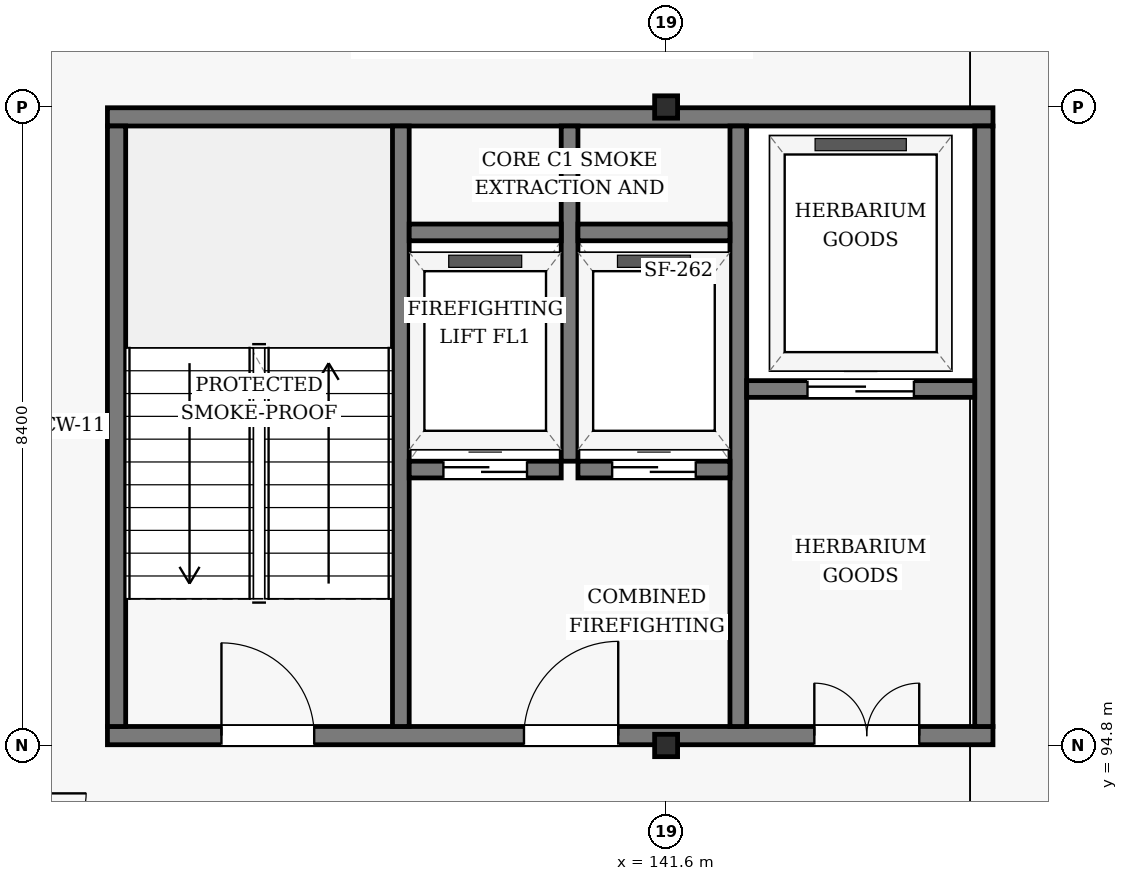
"""IFC4 building model, lengths in metres.
Left out: names, types, materials, properties, quantities, classifications, styles, units other than length and angle.
Written with IfcOpenShell. Run it as: python <this file> out.ifc"""

import sys

from ifc_helpers import new_model, si_unit, direction, frame, frame_2d, origin, origin_2d, place, context, subcontext, project, spatial, rectangle, i_section, extrude, element, fill, save


model = new_model("IFC4")
c1 = context("Model", 3, precision=1e-05, world=origin(), true_north=direction((0.0, 1.0)))
c2 = subcontext(c1, "Body", "Model", "MODEL_VIEW")
j1 = project(units=[si_unit("LENGTHUNIT", "METRE"), si_unit("PLANEANGLEUNIT", "RADIAN")], contexts=[c1])
p1 = place(None, origin())
s1 = spatial("IfcSite", under=j1, at=p1, CompositionType="ELEMENT")
p2 = place(p1, origin())
s2 = spatial("IfcBuilding", under=s1, at=p2, CompositionType="ELEMENT")
p3 = place(p2, frame((0.0, 0.0, 50.4)))
s3 = spatial("IfcBuildingStorey", under=s2, at=p3, CompositionType="ELEMENT", Elevation=50.4)
for number, where, z_axis, x_axis in (
    (1, (141.6, 94.8, 0.0), (0.0, 0.0, 1.0), (1.0, 0.0, 0.0)),
    (2, (141.6, 103.2, 0.0), (0.0, 0.0, 1.0), (1.0, 0.0, 0.0)),
):
    element("IfcColumn", number, at=place(p3, frame(where, z_axis=z_axis, x_axis=x_axis)), inside=s3, PredefinedType="COLUMN", context=c2, shape_type="SweptSolid", body=[
        extrude(i_section(OverallWidth=0.302, OverallDepth=0.294, WebThickness=0.012, FlangeThickness=0.012, FilletRadius=0.018, at=origin_2d()), origin(), (0.0, 0.0, 1.0), 3.6),
    ])
p4 = place(p3, frame((134.25, 94.93, 0.0), z_axis=(0.0, 0.0, 1.0), x_axis=(1.0, 0.0, 0.0)))
e3 = element("IfcWall", 3, at=p4, inside=s3, PredefinedType="SHEAR", context=c2, shape_type="SweptSolid", body=[
    extrude(rectangle(XDim=11.65, YDim=0.24, at=frame_2d((5.825, 0.0))), origin(), (0.0, 0.0, 1.0), 3.346),
])
p5 = place(p4, frame((1.5, 0.0, 0.0)))
e4 = element("IfcOpeningElement", 4, at=p5, cuts=e3, PredefinedType="OPENING", context=c2, shape_type="SweptSolid", body=[
    extrude(rectangle(XDim=1.22, YDim=2.18, at=frame_2d((0.61, 1.09))), frame((0.0, 0.13, 0.0), z_axis=(0.0, -1.0, 0.0), x_axis=(1.0, 0.0, 0.0)), (0.0, 0.0, 1.0), 0.26),
])
p6 = place(p4, frame((5.48, 0.0, 0.0)))
e5 = element("IfcOpeningElement", 5, at=p6, cuts=e3, PredefinedType="OPENING", context=c2, shape_type="SweptSolid", body=[
    extrude(rectangle(XDim=1.24, YDim=2.15, at=frame_2d((0.62, 1.075))), frame((0.0, 0.13, 0.0), z_axis=(0.0, -1.0, 0.0), x_axis=(1.0, 0.0, 0.0)), (0.0, 0.0, 1.0), 0.26),
])
p7 = place(p4, frame((9.3, 0.0, 0.0)))
e6 = element("IfcOpeningElement", 6, at=p7, cuts=e3, PredefinedType="OPENING", context=c2, shape_type="SweptSolid", body=[
    extrude(rectangle(XDim=1.38, YDim=2.15, at=frame_2d((0.69, 1.075))), frame((0.0, 0.13, 0.0), z_axis=(0.0, -1.0, 0.0), x_axis=(1.0, 0.0, 0.0)), (0.0, 0.0, 1.0), 0.26),
])
p8 = place(p3, frame((134.25, 103.07, 0.0), z_axis=(0.0, 0.0, 1.0), x_axis=(1.0, 0.0, 0.0)))
e7 = element("IfcWall", 7, at=p8, inside=s3, PredefinedType="SHEAR", context=c2, shape_type="SweptSolid", body=[
    extrude(rectangle(XDim=11.65, YDim=0.24, at=frame_2d((5.825, 0.0))), origin(), (0.0, 0.0, 1.0), 3.346),
])
p9 = place(p3, frame((134.37, 95.05, 0.0), z_axis=(0.0, 0.0, 1.0), x_axis=(0.0, 1.0, 0.0)))
e8 = element("IfcWall", 8, at=p9, inside=s3, PredefinedType="SHEAR", context=c2, shape_type="SweptSolid", body=[
    extrude(rectangle(XDim=7.9, YDim=0.24, at=frame_2d((3.95, 0.0))), origin(), (0.0, 0.0, 1.0), 3.346),
])
p10 = place(p3, frame((138.11, 95.05, 0.0), z_axis=(0.0, 0.0, 1.0), x_axis=(0.0, 1.0, 0.0)))
e9 = element("IfcWall", 9, at=p10, inside=s3, PredefinedType="SHEAR", context=c2, shape_type="SweptSolid", body=[
    extrude(rectangle(XDim=7.9, YDim=0.22, at=frame_2d((3.95, 0.0))), origin(), (0.0, 0.0, 1.0), 3.346),
])
p11 = place(p3, frame((140.33, 98.54, 0.0), z_axis=(0.0, 0.0, 1.0), x_axis=(0.0, 1.0, 0.0)))
e10 = element("IfcWall", 10, at=p11, inside=s3, PredefinedType="SHEAR", context=c2, shape_type="SweptSolid", body=[
    extrude(rectangle(XDim=4.41, YDim=0.22, at=frame_2d((2.205, 0.0))), origin(), (0.0, 0.0, 1.0), 3.346),
])
p12 = place(p3, frame((142.55, 95.05, 0.0), z_axis=(0.0, 0.0, 1.0), x_axis=(0.0, 1.0, 0.0)))
e11 = element("IfcWall", 11, at=p12, inside=s3, PredefinedType="SHEAR", context=c2, shape_type="SweptSolid", body=[
    extrude(rectangle(XDim=7.9, YDim=0.22, at=frame_2d((3.95, 0.0))), origin(), (0.0, 0.0, 1.0), 3.346),
])
p13 = place(p3, frame((145.78, 95.05, 0.0), z_axis=(0.0, 0.0, 1.0), x_axis=(0.0, 1.0, 0.0)))
e12 = element("IfcWall", 12, at=p13, inside=s3, PredefinedType="SHEAR", context=c2, shape_type="SweptSolid", body=[
    extrude(rectangle(XDim=7.9, YDim=0.24, at=frame_2d((3.95, 0.0))), origin(), (0.0, 0.0, 1.0), 3.346),
])
p14 = place(p3, frame((138.22, 98.43, 0.0), z_axis=(0.0, 0.0, 1.0), x_axis=(1.0, 0.0, 0.0)))
e13 = element("IfcWall", 13, at=p14, inside=s3, PredefinedType="SHEAR", context=c2, shape_type="SweptSolid", body=[
    extrude(rectangle(XDim=2.0, YDim=0.22, at=frame_2d((1.0, 0.0))), origin(), (0.0, 0.0, 1.0), 3.346),
])
p15 = place(p14, frame((0.45, 0.0, 0.0)))
e14 = element("IfcOpeningElement", 14, at=p15, cuts=e13, PredefinedType="OPENING", context=c2, shape_type="SweptSolid", body=[
    extrude(rectangle(XDim=1.1, YDim=2.15, at=frame_2d((0.55, 1.075))), frame((0.0, 0.12, 0.0), z_axis=(0.0, -1.0, 0.0), x_axis=(1.0, 0.0, 0.0)), (0.0, 0.0, 1.0), 0.24),
])
p16 = place(p3, frame((140.44, 98.43, 0.0), z_axis=(0.0, 0.0, 1.0), x_axis=(1.0, 0.0, 0.0)))
e15 = element("IfcWall", 15, at=p16, inside=s3, PredefinedType="SHEAR", context=c2, shape_type="SweptSolid", body=[
    extrude(rectangle(XDim=2.0, YDim=0.22, at=frame_2d((1.0, 0.0))), origin(), (0.0, 0.0, 1.0), 3.346),
])
p17 = place(p16, frame((0.45, 0.0, 0.0)))
e16 = element("IfcOpeningElement", 16, at=p17, cuts=e15, PredefinedType="OPENING", context=c2, shape_type="SweptSolid", body=[
    extrude(rectangle(XDim=1.1, YDim=2.15, at=frame_2d((0.55, 1.075))), frame((0.0, 0.12, 0.0), z_axis=(0.0, -1.0, 0.0), x_axis=(1.0, 0.0, 0.0)), (0.0, 0.0, 1.0), 0.24),
])
for number, where, z_axis, x_axis in (
    (17, (138.22, 101.55, 0.0), (0.0, 0.0, 1.0), (1.0, 0.0, 0.0)),
    (18, (140.44, 101.55, 0.0), (0.0, 0.0, 1.0), (1.0, 0.0, 0.0)),
):
    element("IfcWall", number, at=place(p3, frame(where, z_axis=z_axis, x_axis=x_axis)), inside=s3, PredefinedType="SHEAR", context=c2, shape_type="SweptSolid", body=[
        extrude(rectangle(XDim=2.0, YDim=0.22, at=frame_2d((1.0, 0.0))), origin(), (0.0, 0.0, 1.0), 3.346),
    ])
p18 = place(p3, frame((142.66, 99.49, 0.0), z_axis=(0.0, 0.0, 1.0), x_axis=(1.0, 0.0, 0.0)))
e19 = element("IfcWall", 19, at=p18, inside=s3, PredefinedType="SHEAR", context=c2, shape_type="SweptSolid", body=[
    extrude(rectangle(XDim=3.0, YDim=0.22, at=frame_2d((1.5, 0.0))), origin(), (0.0, 0.0, 1.0), 3.346),
])
p19 = place(p18, frame((0.8, 0.0, 0.0)))
e20 = element("IfcOpeningElement", 20, at=p19, cuts=e19, PredefinedType="OPENING", context=c2, shape_type="SweptSolid", body=[
    extrude(rectangle(XDim=1.4, YDim=2.2, at=frame_2d((0.7, 1.1))), frame((0.0, 0.12, 0.0), z_axis=(0.0, -1.0, 0.0), x_axis=(1.0, 0.0, 0.0)), (0.0, 0.0, 1.0), 0.24),
])
p20 = place(p5, origin())
e21 = element("IfcDoor", 21, at=p20, inside=s3, OperationType="SINGLE_SWING_LEFT", PredefinedType="DOOR", context=c2, shape_type="SweptSolid", body=[
    extrude(rectangle(XDim=1.22, YDim=2.18, at=frame_2d((0.61, 1.09))), frame((0.0, 0.025, 0.0), z_axis=(0.0, -1.0, 0.0), x_axis=(1.0, 0.0, 0.0)), (0.0, 0.0, 1.0), 0.05),
])
fill(e4, e21)
p21 = place(p6, frame((1.24, 0.0, 0.0), z_axis=(0.0, 0.0, 1.0), x_axis=(-1.0, 0.0, 0.0)))
e22 = element("IfcDoor", 22, at=p21, inside=s3, OperationType="SINGLE_SWING_RIGHT", PredefinedType="DOOR", context=c2, shape_type="SweptSolid", body=[
    extrude(rectangle(XDim=1.24, YDim=2.15, at=frame_2d((0.62, 1.075))), frame((0.0, 0.025, 0.0), z_axis=(0.0, -1.0, 0.0), x_axis=(1.0, 0.0, 0.0)), (0.0, 0.0, 1.0), 0.05),
])
fill(e5, e22)
p22 = place(p7, frame((1.38, 0.0, 0.0), z_axis=(0.0, 0.0, 1.0), x_axis=(-1.0, 0.0, 0.0)))
e23 = element("IfcDoor", 23, at=p22, inside=s3, OperationType="DOUBLE_DOOR_SINGLE_SWING", PredefinedType="DOOR", context=c2, shape_type="SweptSolid", body=[
    extrude(rectangle(XDim=1.38, YDim=2.15, at=frame_2d((0.69, 1.075))), frame((0.0, 0.025, 0.0), z_axis=(0.0, -1.0, 0.0), x_axis=(1.0, 0.0, 0.0)), (0.0, 0.0, 1.0), 0.05),
])
fill(e6, e23)
p23 = place(p15, origin())
e24 = element("IfcDoor", 24, at=p23, inside=s3, OperationType="SLIDING_TO_LEFT", PredefinedType="DOOR", context=c2, shape_type="SweptSolid", body=[
    extrude(rectangle(XDim=1.1, YDim=2.15, at=frame_2d((0.55, 1.075))), frame((0.0, 0.025, 0.0), z_axis=(0.0, -1.0, 0.0), x_axis=(1.0, 0.0, 0.0)), (0.0, 0.0, 1.0), 0.05),
])
fill(e14, e24)
p24 = place(p17, origin())
e25 = element("IfcDoor", 25, at=p24, inside=s3, OperationType="SLIDING_TO_LEFT", PredefinedType="DOOR", context=c2, shape_type="SweptSolid", body=[
    extrude(rectangle(XDim=1.1, YDim=2.15, at=frame_2d((0.55, 1.075))), frame((0.0, 0.025, 0.0), z_axis=(0.0, -1.0, 0.0), x_axis=(1.0, 0.0, 0.0)), (0.0, 0.0, 1.0), 0.05),
])
fill(e16, e25)
p25 = place(p19, origin())
e26 = element("IfcDoor", 26, at=p25, inside=s3, OperationType="SLIDING_TO_LEFT", PredefinedType="DOOR", context=c2, shape_type="SweptSolid", body=[
    extrude(rectangle(XDim=1.4, YDim=2.2, at=frame_2d((0.7, 1.1))), frame((0.0, 0.025, 0.0), z_axis=(0.0, -1.0, 0.0), x_axis=(1.0, 0.0, 0.0)), (0.0, 0.0, 1.0), 0.05),
])
fill(e20, e26)
save(model, sys.argv[1])
